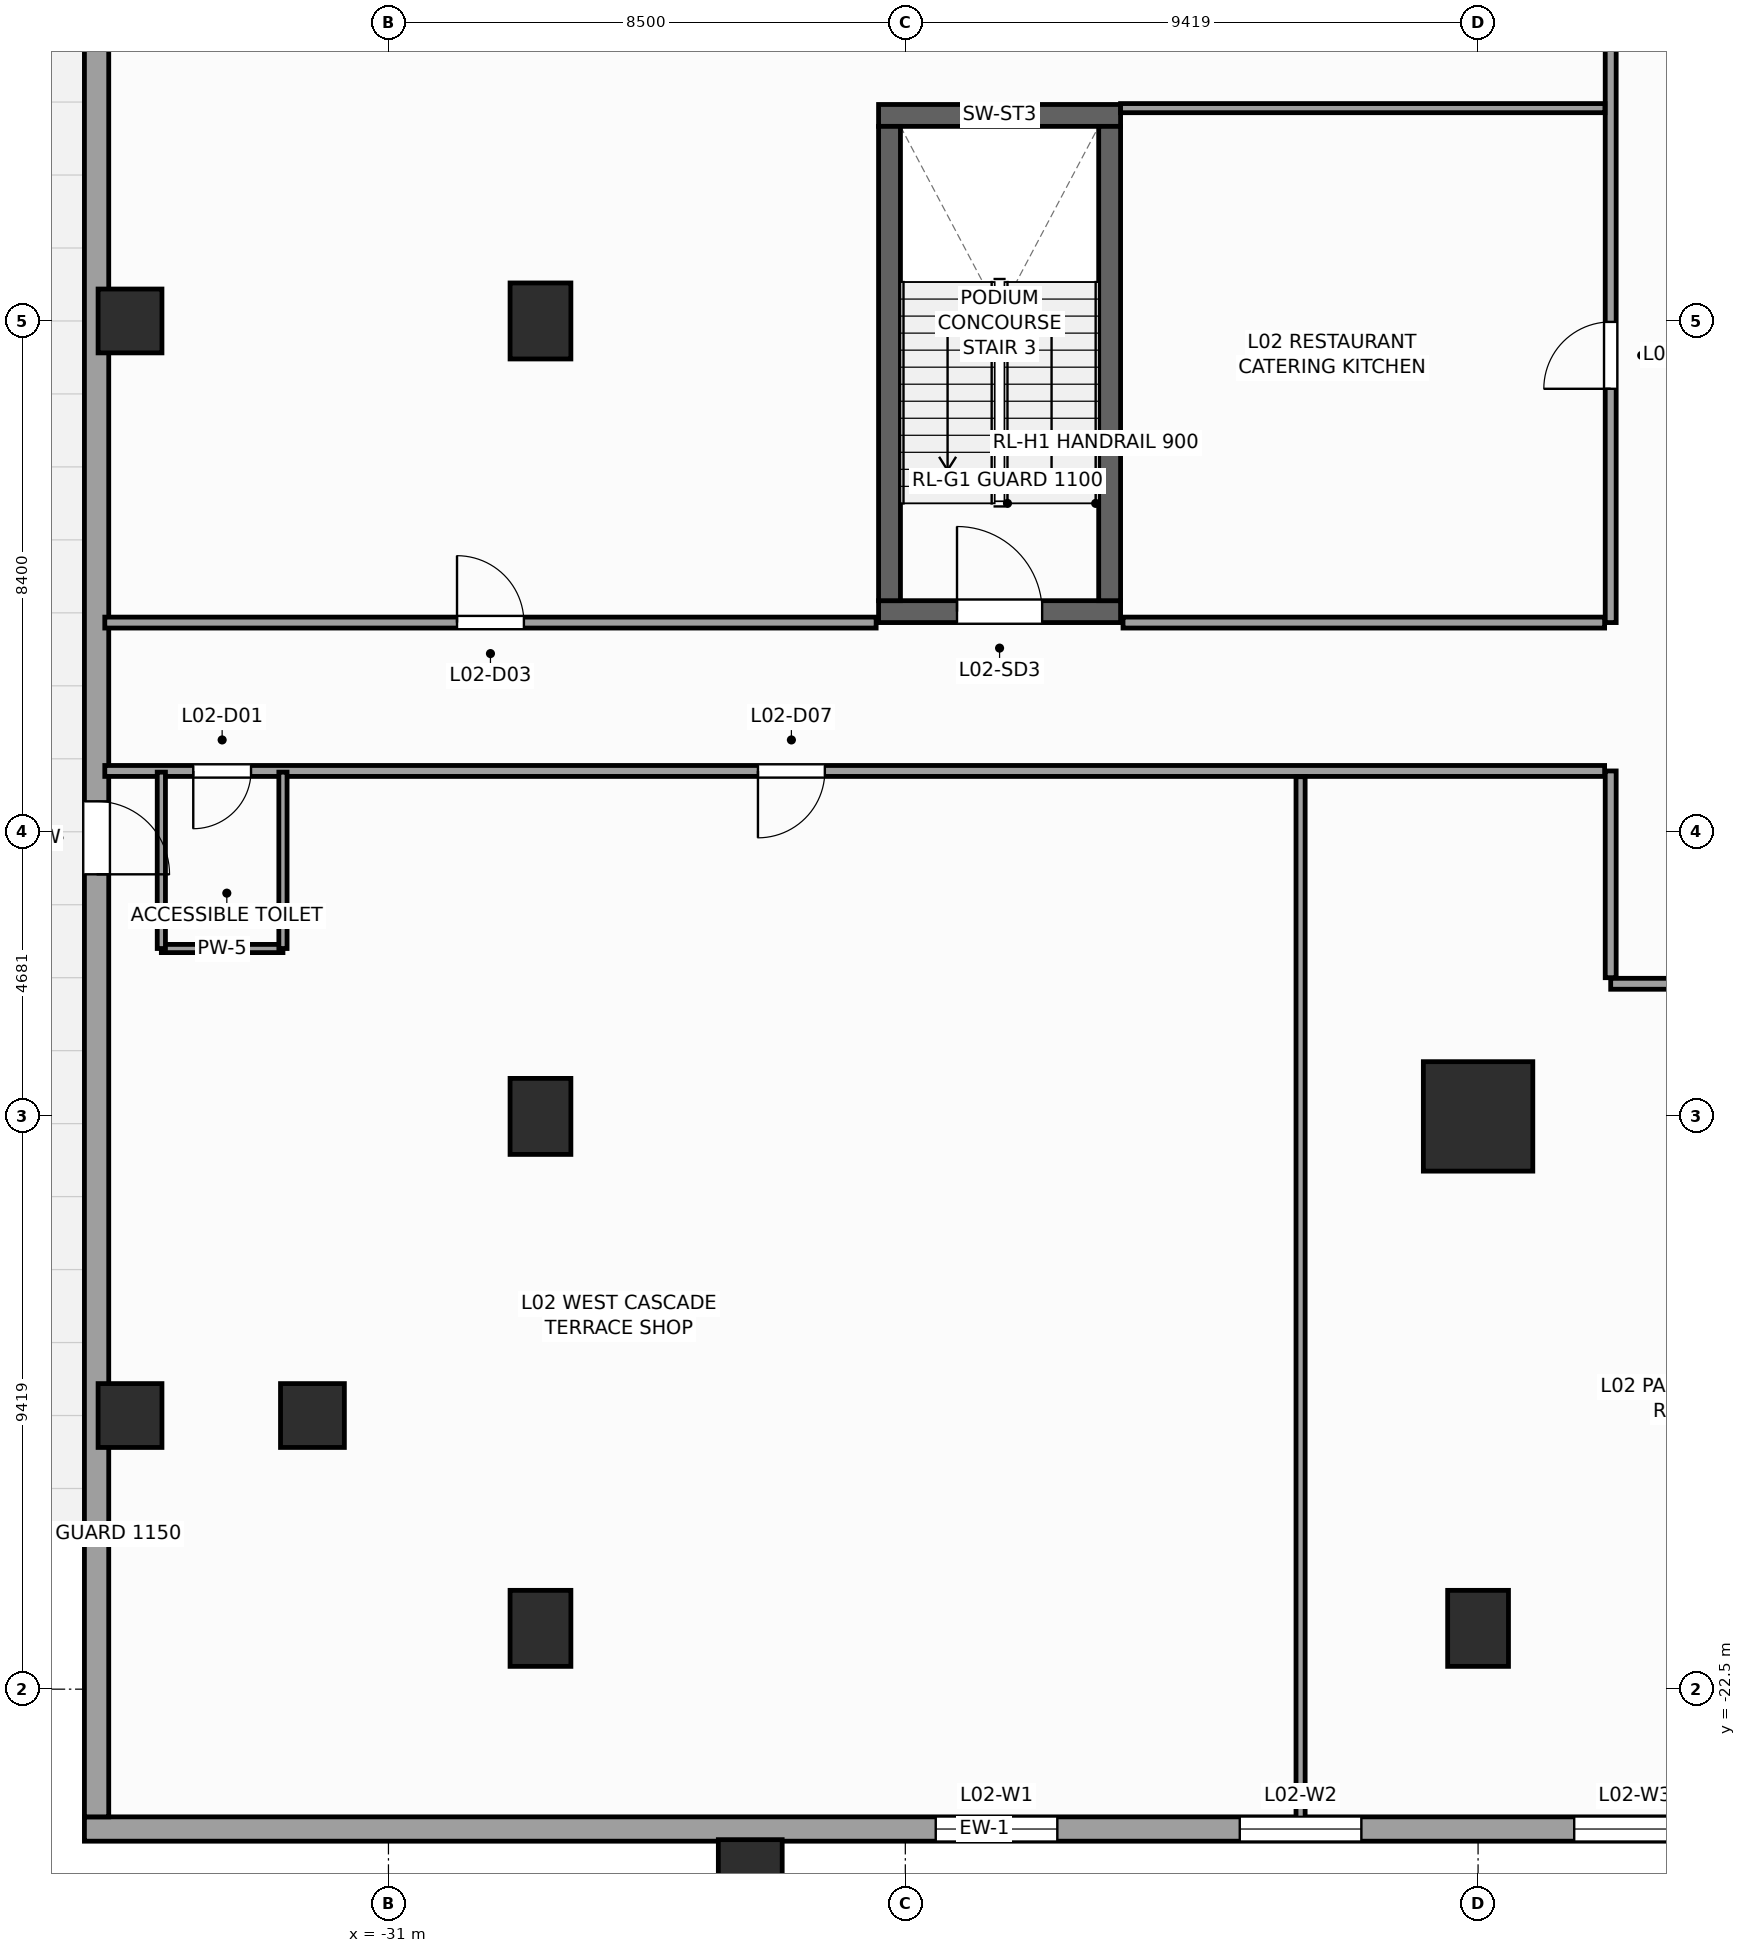
"""IFC4 building model, lengths in metres.
Left out: names, types, materials, properties, quantities, classifications, styles, units other than length and angle.
Written with IfcOpenShell. Run it as: python <this file> out.ifc"""

import sys

from ifc_helpers import new_model, si_unit, direction, frame, frame_2d, origin, origin_2d, place, context, subcontext, project, spatial, rectangle, extrude, source, transform, mapped, element, fill, save


model = new_model("IFC4")
c1 = context("Model", 3, precision=1e-05, world=origin(), true_north=direction((0.0, 1.0)))
c2 = subcontext(c1, "Body", "Model", "MODEL_VIEW")
j1 = project(units=[si_unit("LENGTHUNIT", "METRE"), si_unit("PLANEANGLEUNIT", "RADIAN")], contexts=[c1])
p1 = place(None, origin())
s1 = spatial("IfcSite", under=j1, at=p1, CompositionType="ELEMENT")
p2 = place(p1, origin())
s2 = spatial("IfcBuilding", under=s1, at=p2, CompositionType="ELEMENT")
p3 = place(p2, frame((0.0, 0.0, 11.0)))
s3 = spatial("IfcBuildingStorey", under=s2, at=p3, CompositionType="ELEMENT", Elevation=11.0)
p4 = place(p3, frame((-22.94, -4.78, 0.0), z_axis=(0.0, 0.0, 1.0), x_axis=(1.0, 0.0, 0.0)))
e1 = element("IfcWall", 1, at=p4, inside=s3, PredefinedType="SHEAR", context=c2, shape_type="SweptSolid", body=[
    extrude(rectangle(XDim=3.98, YDim=0.36, at=frame_2d((1.99, 0.0))), origin(), (0.0, 0.0, 1.0), 5.0),
])
p5 = place(p4, frame((1.29, 0.0, 0.0)))
e2 = element("IfcOpeningElement", 2, at=p5, cuts=e1, PredefinedType="OPENING", context=c2, shape_type="SweptSolid", body=[
    extrude(rectangle(XDim=1.4, YDim=2.2, at=frame_2d((0.7, 1.1))), frame((0.0, 0.19, 0.0), z_axis=(0.0, -1.0, 0.0), x_axis=(1.0, 0.0, 0.0)), (0.0, 0.0, 1.0), 0.38),
])
p6 = place(p3, frame((-22.94, 3.38, 0.0), z_axis=(0.0, 0.0, 1.0), x_axis=(1.0, 0.0, 0.0)))
e3 = element("IfcWall", 3, at=p6, inside=s3, PredefinedType="SHEAR", context=c2, shape_type="SweptSolid", body=[
    extrude(rectangle(XDim=3.98, YDim=0.36, at=frame_2d((1.99, 0.0))), origin(), (0.0, 0.0, 1.0), 5.0),
])
for number, where, z_axis, x_axis in (
    (4, (-22.76, -4.6, 0.0), (0.0, 0.0, 1.0), (0.0, 1.0, 0.0)),
    (5, (-19.14, -4.6, 0.0), (0.0, 0.0, 1.0), (0.0, 1.0, 0.0)),
):
    element("IfcWall", number, at=place(p3, frame(where, z_axis=z_axis, x_axis=x_axis)), inside=s3, PredefinedType="SHEAR", context=c2, shape_type="SweptSolid", body=[
        extrude(rectangle(XDim=7.8, YDim=0.36, at=frame_2d((3.9, 0.0))), origin(), (0.0, 0.0, 1.0), 5.0),
    ])
m1 = source(origin(), c2, "Body", "SweptSolid", [
    extrude(rectangle(XDim=1.8, YDim=1.8, at=origin_2d()), origin(), (0.0, 0.0, 1.0), 5.0),
])
p7 = place(p3, frame((-13.081, -13.081, 0.0), z_axis=(0.0, 0.0, 1.0), x_axis=(1.0, 0.0, 0.0)))
e6 = element("IfcColumn", 6, at=p7, inside=s3, PredefinedType="COLUMN", context=c2, shape_type="MappedRepresentation", body=[
    mapped(m1, transform((0.0, 0.0, 0.0), scale=1.0)),
])
m2 = source(origin(), c2, "Body", "SweptSolid", [
    extrude(rectangle(XDim=1.0, YDim=1.25, at=origin_2d()), origin(), (0.0, 0.0, 1.0), 5.0),
])
for number, where, z_axis, x_axis in (
    (7, (-28.5, -21.5, 0.0), (0.0, 0.0, 1.0), (1.0, 0.0, 0.0)),
    (8, (-13.081, -21.5, 0.0), (0.0, 0.0, 1.0), (1.0, 0.0, 0.0)),
    (9, (-28.5, -13.081, 0.0), (0.0, 0.0, 1.0), (1.0, 0.0, 0.0)),
    (10, (-28.5, 0.0, 0.0), (0.0, 0.0, 1.0), (1.0, 0.0, 0.0)),
):
    element("IfcColumn", number, at=place(p3, frame(where, z_axis=z_axis, x_axis=x_axis)), inside=s3, PredefinedType="COLUMN", context=c2, shape_type="MappedRepresentation", body=[
        mapped(m2, transform((0.0, 0.0, 0.0), scale=1.0)),
    ])
m3 = source(origin(), c2, "Body", "SweptSolid", [
    extrude(rectangle(XDim=1.05, YDim=1.05, at=origin_2d()), origin(), (0.0, 0.0, 1.0), 5.0),
])
for number, where, z_axis, x_axis in (
    (11, (-25.05, -25.5, 0.0), (0.0, 0.0, 1.0), (1.0, 0.0, 0.0)),
    (12, (-32.25, -18.0, 0.0), (0.0, 0.0, 1.0), (1.0, 0.0, 0.0)),
    (13, (-35.25, -18.0, 0.0), (0.0, 0.0, 1.0), (1.0, 0.0, 0.0)),
    (14, (-35.25, 0.0, 0.0), (0.0, 0.0, 1.0), (1.0, 0.0, 0.0)),
):
    element("IfcColumn", number, at=place(p3, frame(where, z_axis=z_axis, x_axis=x_axis)), inside=s3, PredefinedType="COLUMN", context=c2, shape_type="MappedRepresentation", body=[
        mapped(m3, transform((0.0, 0.0, 0.0), scale=1.0)),
    ])
p8 = place(p3, frame((-36.0, -24.8, 0.0), z_axis=(0.0, 0.0, 1.0), x_axis=(1.0, 0.0, 0.0)))
e15 = element("IfcWall", 15, at=p8, inside=s3, PredefinedType="STANDARD", context=c2, shape_type="SweptSolid", body=[
    extrude(rectangle(XDim=29.6, YDim=0.4, at=frame_2d((14.8, 0.0))), origin(), (0.0, 0.0, 1.0), 4.66),
])
p9 = place(p8, frame((14.0, 0.0, 0.85)))
e16 = element("IfcOpeningElement", 16, at=p9, cuts=e15, PredefinedType="OPENING", context=c2, shape_type="SweptSolid", body=[
    extrude(rectangle(XDim=2.0, YDim=2.8, at=frame_2d((1.0, 1.4))), frame((0.0, 0.21, 0.0), z_axis=(0.0, -1.0, 0.0), x_axis=(1.0, 0.0, 0.0)), (0.0, 0.0, 1.0), 0.42),
])
p10 = place(p8, frame((19.0, 0.0, 0.85)))
e17 = element("IfcOpeningElement", 17, at=p10, cuts=e15, PredefinedType="OPENING", context=c2, shape_type="SweptSolid", body=[
    extrude(rectangle(XDim=2.0, YDim=2.8, at=frame_2d((1.0, 1.4))), frame((0.0, 0.21, 0.0), z_axis=(0.0, -1.0, 0.0), x_axis=(1.0, 0.0, 0.0)), (0.0, 0.0, 1.0), 0.42),
])
p11 = place(p8, frame((24.5, 0.0, 0.85)))
e18 = element("IfcOpeningElement", 18, at=p11, cuts=e15, PredefinedType="OPENING", context=c2, shape_type="SweptSolid", body=[
    extrude(rectangle(XDim=2.0, YDim=2.8, at=frame_2d((1.0, 1.4))), frame((0.0, 0.21, 0.0), z_axis=(0.0, -1.0, 0.0), x_axis=(1.0, 0.0, 0.0)), (0.0, 0.0, 1.0), 0.42),
])
p12 = place(p3, frame((-35.8, -24.6, 0.0), z_axis=(0.0, 0.0, 1.0), x_axis=(0.0, 1.0, 0.0)))
e19 = element("IfcWall", 19, at=p12, inside=s3, PredefinedType="STANDARD", context=c2, shape_type="SweptSolid", body=[
    extrude(rectangle(XDim=49.2, YDim=0.4, at=frame_2d((24.6, 0.0))), origin(), (0.0, 0.0, 1.0), 4.66),
])
p13 = place(p12, frame((15.5, 0.0, 0.0)))
e20 = element("IfcOpeningElement", 20, at=p13, cuts=e19, PredefinedType="OPENING", context=c2, shape_type="SweptSolid", body=[
    extrude(rectangle(XDim=1.2, YDim=2.3, at=frame_2d((0.6, 1.15))), frame((0.0, 0.21, 0.0), z_axis=(0.0, -1.0, 0.0), x_axis=(1.0, 0.0, 0.0)), (0.0, 0.0, 1.0), 0.42),
])
p14 = place(p3, frame((-10.9, -10.9, 0.0), z_axis=(0.0, 0.0, 1.0), x_axis=(1.0, 0.0, 0.0)))
e21 = element("IfcWall", 21, at=p14, inside=s3, PredefinedType="PARTITIONING", context=c2, shape_type="SweptSolid", body=[
    extrude(rectangle(XDim=12.6, YDim=0.18, at=frame_2d((6.3, 0.0))), origin(), (0.0, 0.0, 1.0), 4.66),
])
p15 = place(p3, frame((-10.9, -10.8, 0.0), z_axis=(0.0, 0.0, 1.0), x_axis=(0.0, 1.0, 0.0)))
e22 = element("IfcWall", 22, at=p15, inside=s3, PredefinedType="PARTITIONING", context=c2, shape_type="SweptSolid", body=[
    extrude(rectangle(XDim=3.4, YDim=0.18, at=frame_2d((1.7, 0.0))), origin(), (0.0, 0.0, 1.0), 4.66),
])
p16 = place(p3, frame((-10.9, -4.96, 0.0), z_axis=(0.0, 0.0, 1.0), x_axis=(0.0, 1.0, 0.0)))
e23 = element("IfcWall", 23, at=p16, inside=s3, PredefinedType="PARTITIONING", context=c2, shape_type="SweptSolid", body=[
    extrude(rectangle(XDim=15.76, YDim=0.18, at=frame_2d((7.88, 0.0))), origin(), (0.0, 0.0, 1.0), 4.66),
])
p17 = place(p16, frame((3.844, 0.0, 0.0)))
e24 = element("IfcOpeningElement", 24, at=p17, cuts=e23, PredefinedType="OPENING", context=c2, shape_type="SweptSolid", body=[
    extrude(rectangle(XDim=1.1, YDim=2.2, at=frame_2d((0.55, 1.1))), frame((0.0, 0.1, 0.0), z_axis=(0.0, -1.0, 0.0), x_axis=(1.0, 0.0, 0.0)), (0.0, 0.0, 1.0), 0.2),
])
p18 = place(p3, frame((-35.665, -7.4, 0.0), z_axis=(0.0, 0.0, 1.0), x_axis=(1.0, 0.0, 0.0)))
e25 = element("IfcWall", 25, at=p18, inside=s3, PredefinedType="PARTITIONING", context=c2, shape_type="SweptSolid", body=[
    extrude(rectangle(XDim=24.665, YDim=0.18, at=frame_2d((12.333, 0.0))), origin(), (0.0, 0.0, 1.0), 4.66),
])
p19 = place(p18, frame((1.455, 0.0, 0.0)))
e26 = element("IfcOpeningElement", 26, at=p19, cuts=e25, PredefinedType="OPENING", context=c2, shape_type="SweptSolid", body=[
    extrude(rectangle(XDim=0.95, YDim=2.1, at=frame_2d((0.475, 1.05))), frame((0.0, 0.1, 0.0), z_axis=(0.0, -1.0, 0.0), x_axis=(1.0, 0.0, 0.0)), (0.0, 0.0, 1.0), 0.2),
])
p20 = place(p18, frame((10.741, 0.0, 0.0)))
e27 = element("IfcOpeningElement", 27, at=p20, cuts=e25, PredefinedType="OPENING", context=c2, shape_type="SweptSolid", body=[
    extrude(rectangle(XDim=1.1, YDim=2.2, at=frame_2d((0.55, 1.1))), frame((0.0, 0.1, 0.0), z_axis=(0.0, -1.0, 0.0), x_axis=(1.0, 0.0, 0.0)), (0.0, 0.0, 1.0), 0.2),
])
p21 = place(p3, frame((-35.665, -4.96, 0.0), z_axis=(0.0, 0.0, 1.0), x_axis=(1.0, 0.0, 0.0)))
e28 = element("IfcWall", 28, at=p21, inside=s3, PredefinedType="PARTITIONING", context=c2, shape_type="SweptSolid", body=[
    extrude(rectangle(XDim=12.685, YDim=0.18, at=frame_2d((6.343, 0.0))), origin(), (0.0, 0.0, 1.0), 4.66),
])
p22 = place(p21, frame((5.792, 0.0, 0.0)))
e29 = element("IfcOpeningElement", 29, at=p22, cuts=e28, PredefinedType="OPENING", context=c2, shape_type="SweptSolid", body=[
    extrude(rectangle(XDim=1.1, YDim=2.2, at=frame_2d((0.55, 1.1))), frame((0.0, 0.1, 0.0), z_axis=(0.0, -1.0, 0.0), x_axis=(1.0, 0.0, 0.0)), (0.0, 0.0, 1.0), 0.2),
])
p23 = place(p3, frame((-18.92, -4.96, 0.0), z_axis=(0.0, 0.0, 1.0), x_axis=(1.0, 0.0, 0.0)))
e30 = element("IfcWall", 30, at=p23, inside=s3, PredefinedType="PARTITIONING", context=c2, shape_type="SweptSolid", body=[
    extrude(rectangle(XDim=7.92, YDim=0.18, at=frame_2d((3.96, 0.0))), origin(), (0.0, 0.0, 1.0), 4.66),
])
p24 = place(p3, frame((-18.96, 3.5, 0.0), z_axis=(0.0, 0.0, 1.0), x_axis=(1.0, 0.0, 0.0)))
e31 = element("IfcWall", 31, at=p24, inside=s3, PredefinedType="PARTITIONING", context=c2, shape_type="SweptSolid", body=[
    extrude(rectangle(XDim=7.965, YDim=0.15, at=frame_2d((3.982, 0.0))), origin(), (0.0, 0.0, 1.0), 4.66),
])
p25 = place(p3, frame((-16.0, -24.665, 0.0), z_axis=(0.0, 0.0, 1.0), x_axis=(0.0, 1.0, 0.0)))
e32 = element("IfcWall", 32, at=p25, inside=s3, PredefinedType="PARTITIONING", context=c2, shape_type="SweptSolid", body=[
    extrude(rectangle(XDim=17.17, YDim=0.15, at=frame_2d((8.585, 0.0))), origin(), (0.0, 0.0, 1.0), 4.66),
])
p26 = place(p3, frame((-34.735, -10.32, 0.0), z_axis=(0.0, 0.0, 1.0), x_axis=(1.0, 0.0, 0.0)))
e33 = element("IfcWall", 33, at=p26, inside=s3, PredefinedType="PARTITIONING", context=c2, shape_type="SweptSolid", body=[
    extrude(rectangle(XDim=2.0, YDim=0.135, at=frame_2d((1.0, 0.0))), origin(), (0.0, 0.0, 1.0), 4.66),
])
for number, where, z_axis, x_axis in (
    (34, (-32.735, -10.32, 0.0), (0.0, 0.0, 1.0), (0.0, 1.0, 0.0)),
    (35, (-34.735, -10.32, 0.0), (0.0, 0.0, 1.0), (0.0, 1.0, 0.0)),
):
    element("IfcWall", number, at=place(p3, frame(where, z_axis=z_axis, x_axis=x_axis)), inside=s3, PredefinedType="PARTITIONING", context=c2, shape_type="SweptSolid", body=[
        extrude(rectangle(XDim=2.9, YDim=0.135, at=frame_2d((1.45, 0.0))), origin(), (0.0, 0.0, 1.0), 4.66),
    ])
m4 = source(origin(), c2, "Body", "SweptSolid", [
    extrude(rectangle(XDim=2.0, YDim=2.8, at=frame_2d((1.0, 1.4))), frame((0.0, 0.03, 0.0), z_axis=(0.0, -1.0, 0.0), x_axis=(1.0, 0.0, 0.0)), (0.0, 0.0, 1.0), 0.06),
])
p27 = place(p9, origin())
e36 = element("IfcWindow", 36, at=p27, inside=s3, PartitioningType="SINGLE_PANEL", PredefinedType="WINDOW", context=c2, shape_type="MappedRepresentation", body=[
    mapped(m4, transform((0.0, 0.0, 0.0), scale=1.0)),
])
fill(e16, e36)
p28 = place(p10, origin())
e37 = element("IfcWindow", 37, at=p28, inside=s3, PartitioningType="SINGLE_PANEL", PredefinedType="WINDOW", context=c2, shape_type="MappedRepresentation", body=[
    mapped(m4, transform((0.0, 0.0, 0.0), scale=1.0)),
])
fill(e17, e37)
p29 = place(p11, origin())
e38 = element("IfcWindow", 38, at=p29, inside=s3, PartitioningType="SINGLE_PANEL", PredefinedType="WINDOW", context=c2, shape_type="MappedRepresentation", body=[
    mapped(m4, transform((0.0, 0.0, 0.0), scale=1.0)),
])
fill(e18, e38)
m5 = source(origin(), c2, "Body", "SweptSolid", [
    extrude(rectangle(XDim=1.2, YDim=2.3, at=frame_2d((0.6, 1.15))), frame((0.0, 0.025, 0.0), z_axis=(0.0, -1.0, 0.0), x_axis=(1.0, 0.0, 0.0)), (0.0, 0.0, 1.0), 0.05),
])
p30 = place(p13, frame((1.2, 0.0, 0.0), z_axis=(0.0, 0.0, 1.0), x_axis=(-1.0, 0.0, 0.0)))
e39 = element("IfcDoor", 39, at=p30, inside=s3, OperationType="SINGLE_SWING_LEFT", PredefinedType="DOOR", context=c2, shape_type="MappedRepresentation", body=[
    mapped(m5, transform((0.0, 0.0, 0.0), scale=1.0)),
])
fill(e20, e39)
m6 = source(origin(), c2, "Body", "SweptSolid", [
    extrude(rectangle(XDim=1.4, YDim=2.2, at=frame_2d((0.7, 1.1))), frame((0.0, 0.025, 0.0), z_axis=(0.0, -1.0, 0.0), x_axis=(1.0, 0.0, 0.0)), (0.0, 0.0, 1.0), 0.05),
])
p31 = place(p5, origin())
e40 = element("IfcDoor", 40, at=p31, inside=s3, OperationType="SINGLE_SWING_LEFT", PredefinedType="DOOR", context=c2, shape_type="MappedRepresentation", body=[
    mapped(m6, transform((0.0, 0.0, 0.0), scale=1.0)),
])
fill(e2, e40)
m7 = source(origin(), c2, "Body", "SweptSolid", [
    extrude(rectangle(XDim=0.95, YDim=2.1, at=frame_2d((0.475, 1.05))), frame((0.0, 0.025, 0.0), z_axis=(0.0, -1.0, 0.0), x_axis=(1.0, 0.0, 0.0)), (0.0, 0.0, 1.0), 0.05),
])
p32 = place(p19, frame((0.95, 0.0, 0.0), z_axis=(0.0, 0.0, 1.0), x_axis=(-1.0, 0.0, 0.0)))
e41 = element("IfcDoor", 41, at=p32, inside=s3, OperationType="SINGLE_SWING_LEFT", PredefinedType="DOOR", context=c2, shape_type="MappedRepresentation", body=[
    mapped(m7, transform((0.0, 0.0, 0.0), scale=1.0)),
])
fill(e26, e41)
m8 = source(origin(), c2, "Body", "SweptSolid", [
    extrude(rectangle(XDim=1.1, YDim=2.2, at=frame_2d((0.55, 1.1))), frame((0.0, 0.025, 0.0), z_axis=(0.0, -1.0, 0.0), x_axis=(1.0, 0.0, 0.0)), (0.0, 0.0, 1.0), 0.05),
])
p33 = place(p22, origin())
e42 = element("IfcDoor", 42, at=p33, inside=s3, OperationType="SINGLE_SWING_LEFT", PredefinedType="DOOR", context=c2, shape_type="MappedRepresentation", body=[
    mapped(m8, transform((0.0, 0.0, 0.0), scale=1.0)),
])
fill(e29, e42)
p34 = place(p17, origin())
e43 = element("IfcDoor", 43, at=p34, inside=s3, OperationType="SINGLE_SWING_LEFT", PredefinedType="DOOR", context=c2, shape_type="MappedRepresentation", body=[
    mapped(m8, transform((0.0, 0.0, 0.0), scale=1.0)),
])
fill(e24, e43)
p35 = place(p20, frame((1.1, 0.0, 0.0), z_axis=(0.0, 0.0, 1.0), x_axis=(-1.0, 0.0, 0.0)))
e44 = element("IfcDoor", 44, at=p35, inside=s3, OperationType="SINGLE_SWING_LEFT", PredefinedType="DOOR", context=c2, shape_type="MappedRepresentation", body=[
    mapped(m8, transform((0.0, 0.0, 0.0), scale=1.0)),
])
fill(e27, e44)
save(model, sys.argv[1])
